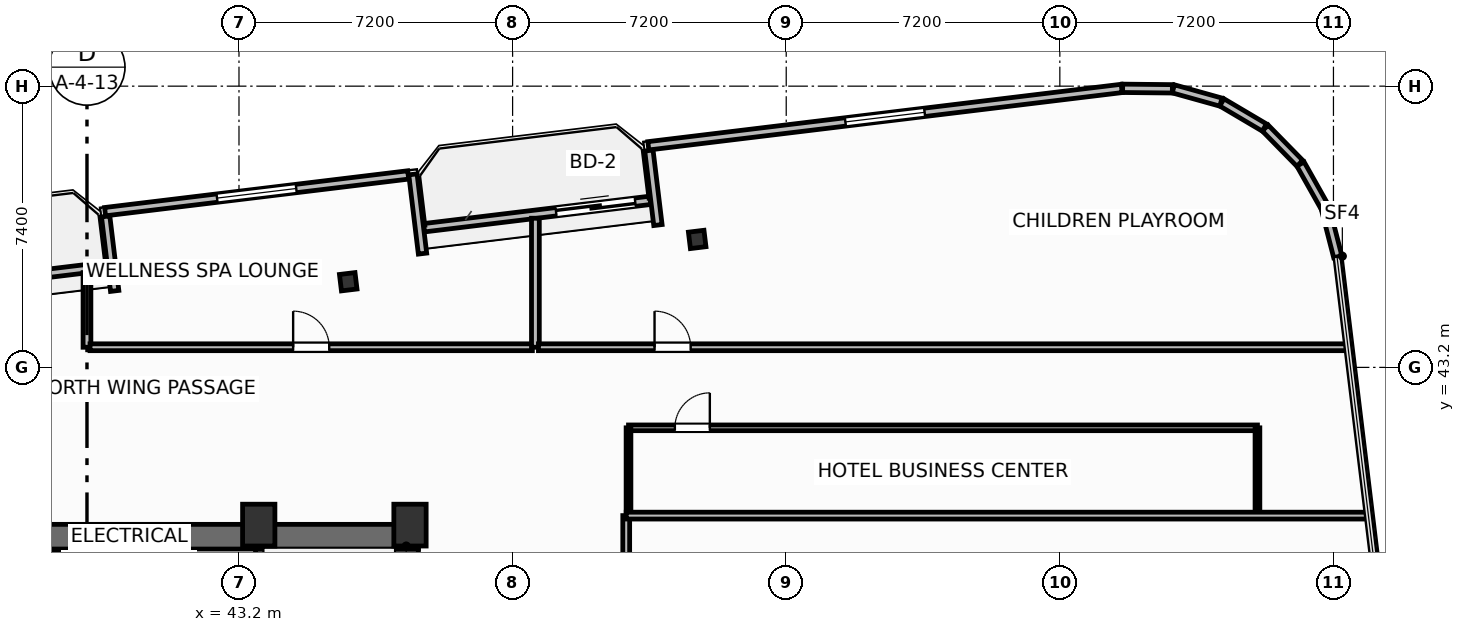
"""IFC4 building model, lengths in metres.
Left out: names, types, materials, properties, quantities, classifications, styles, units other than length and angle.
Written with IfcOpenShell. Run it as: python <this file> out.ifc"""

import sys

from ifc_helpers import new_model, si_unit, direction, frame, frame_2d, origin, origin_2d, place, context, subcontext, project, spatial, rectangle, i_section, extrude, element, fill, save


model = new_model("IFC4")
c1 = context("Model", 3, precision=1e-05, world=origin(), true_north=direction((0.0, 1.0)))
c2 = subcontext(c1, "Body", "Model", "MODEL_VIEW")
j1 = project(units=[si_unit("LENGTHUNIT", "METRE"), si_unit("PLANEANGLEUNIT", "RADIAN")], contexts=[c1])
p1 = place(None, origin())
s1 = spatial("IfcSite", under=j1, at=p1, CompositionType="ELEMENT")
p2 = place(p1, origin())
s2 = spatial("IfcBuilding", under=s1, at=p2, CompositionType="ELEMENT")
p3 = place(p2, frame((0.0, 0.0, 204.2)))
s3 = spatial("IfcBuildingStorey", under=s2, at=p3, CompositionType="ELEMENT", Elevation=204.2)
for number, where, z_axis, x_axis in (
    (1, (43.72, 39.05, 0.0), (0.0, 0.0, 1.0), (1.0, 0.0, 0.0)),
    (2, (47.7, 39.05, 0.0), (0.0, 0.0, 1.0), (1.0, 0.0, 0.0)),
):
    element("IfcColumn", number, at=place(p3, frame(where, z_axis=z_axis, x_axis=x_axis)), inside=s3, PredefinedType="COLUMN", context=c2, shape_type="SweptSolid", body=[
        extrude(rectangle(XDim=0.85, YDim=1.1, at=origin_2d()), origin(), (0.0, 0.0, 1.0), 3.7),
    ])
p4 = place(p3, frame((30.48, 38.745, 0.0), z_axis=(0.0, 0.0, 1.0), x_axis=(1.0, 0.0, 0.0)))
e3 = element("IfcWall", 3, at=p4, inside=s3, PredefinedType="SHEAR", context=c2, shape_type="SweptSolid", body=[
    extrude(rectangle(XDim=17.44, YDim=0.65, at=frame_2d((8.72, 0.0))), origin(), (0.0, 0.0, 1.0), 3.38),
])
p5 = place(p3, frame((47.595, 29.2, 0.0), z_axis=(0.0, 0.0, 1.0), x_axis=(0.0, 1.0, 0.0)))
e4 = element("IfcWall", 4, at=p5, inside=s3, PredefinedType="SHEAR", context=c2, shape_type="SweptSolid", body=[
    extrude(rectangle(XDim=9.22, YDim=0.65, at=frame_2d((4.61, 0.0))), origin(), (0.0, 0.0, 1.0), 3.38),
])
p6 = place(p3, frame((43.76, 29.2, 0.0), z_axis=(0.0, 0.0, 1.0), x_axis=(0.0, 1.0, 0.0)))
e5 = element("IfcWall", 5, at=p6, inside=s3, PredefinedType="SHEAR", context=c2, shape_type="SweptSolid", body=[
    extrude(rectangle(XDim=9.22, YDim=0.25, at=frame_2d((4.61, 0.0))), origin(), (0.0, 0.0, 1.0), 3.38),
])
p7 = place(p6, frame((0.65, 0.0, 0.0)))
e6 = element("IfcOpeningElement", 6, at=p7, cuts=e5, PredefinedType="OPENING", context=c2, shape_type="SweptSolid", body=[
    extrude(rectangle(XDim=1.05, YDim=2.15, at=frame_2d((0.525, 1.075))), frame((0.0, 0.135, 0.0), z_axis=(0.0, -1.0, 0.0), x_axis=(1.0, 0.0, 0.0)), (0.0, 0.0, 1.0), 0.27),
])
for number, where, z_axis, x_axis in (
    (7, (55.257, 46.567, 0.0), (0.0, 0.0, 1.0), (0.993, 0.12, 0.0)),
    (8, (46.075, 45.454, 0.0), (0.0, 0.0, 1.0), (0.993, 0.12, 0.0)),
):
    element("IfcColumn", number, at=place(p3, frame(where, z_axis=z_axis, x_axis=x_axis)), inside=s3, PredefinedType="COLUMN", context=c2, shape_type="SweptSolid", body=[
        extrude(i_section(OverallWidth=0.412, OverallDepth=0.435, WebThickness=0.036, FlangeThickness=0.057, FilletRadius=0.025, at=origin_2d()), origin(), (0.0, 0.0, 1.0), 3.7),
    ])
p8 = place(p3, frame((33.773, 45.141, 0.0), z_axis=(0.0, 0.0, 1.0), x_axis=(0.992735402148, 0.120318000826, 0.0)))
e9 = element("IfcWall", 9, at=p8, inside=s3, PredefinedType="SOLIDWALL", context=c2, shape_type="SweptSolid", body=[
    extrude(rectangle(XDim=6.0, YDim=0.22, at=frame_2d((3.0, 0.0))), origin(), (0.0, 0.0, 1.0), 2.66),
])
p9 = place(p8, frame((0.4, 0.0, 0.0)))
e10 = element("IfcOpeningElement", 10, at=p9, cuts=e9, PredefinedType="OPENING", context=c2, shape_type="SweptSolid", body=[
    extrude(rectangle(XDim=2.1, YDim=2.3, at=frame_2d((1.05, 1.15))), frame((0.0, 0.12, 0.0), z_axis=(0.0, -1.0, 0.0), x_axis=(1.0, 0.0, 0.0)), (0.0, 0.0, 1.0), 0.24),
])
p10 = place(p3, frame((48.068, 46.874, 0.0), z_axis=(0.0, 0.0, 1.0), x_axis=(0.992729951822, 0.120362962556, 0.0)))
e11 = element("IfcWall", 11, at=p10, inside=s3, PredefinedType="SOLIDWALL", context=c2, shape_type="SweptSolid", body=[
    extrude(rectangle(XDim=6.0, YDim=0.22, at=frame_2d((3.0, 0.0))), origin(), (0.0, 0.0, 1.0), 2.66),
])
p11 = place(p10, frame((3.5, 0.0, 0.0)))
e12 = element("IfcOpeningElement", 12, at=p11, cuts=e11, PredefinedType="OPENING", context=c2, shape_type="SweptSolid", body=[
    extrude(rectangle(XDim=2.1, YDim=2.3, at=frame_2d((1.05, 1.15))), frame((0.0, 0.12, 0.0), z_axis=(0.0, -1.0, 0.0), x_axis=(1.0, 0.0, 0.0)), (0.0, 0.0, 1.0), 0.24),
])
p12 = place(p3, frame((72.114, 46.112, 0.0), z_axis=(0.0, 0.0, 1.0), x_axis=(-0.248942347653, 0.968518305219, 0.0)))
e13 = element("IfcWall", 13, at=p12, inside=s3, PredefinedType="SOLIDWALL", context=c2, shape_type="SweptSolid", body=[
    extrude(rectangle(XDim=1.326, YDim=0.22, at=frame_2d((0.663, 0.0))), origin(), (0.0, 0.0, 1.0), 2.66),
])
p13 = place(p3, frame((71.771, 47.418, 0.0), z_axis=(0.0, 0.0, 1.0), x_axis=(-0.491098509465, 0.871104043155, 0.0)))
e14 = element("IfcWall", 14, at=p13, inside=s3, PredefinedType="SOLIDWALL", context=c2, shape_type="SweptSolid", body=[
    extrude(rectangle(XDim=1.301, YDim=0.22, at=frame_2d((0.65, 0.0))), origin(), (0.0, 0.0, 1.0), 2.66),
])
p14 = place(p3, frame((71.115, 48.569, 0.0), z_axis=(0.0, 0.0, 1.0), x_axis=(-0.699844331926, 0.714295394827, 0.0)))
e15 = element("IfcWall", 15, at=p14, inside=s3, PredefinedType="SOLIDWALL", context=c2, shape_type="SweptSolid", body=[
    extrude(rectangle(XDim=1.301, YDim=0.22, at=frame_2d((0.65, 0.0))), origin(), (0.0, 0.0, 1.0), 2.66),
])
p15 = place(p3, frame((70.183, 49.511, 0.0), z_axis=(0.0, 0.0, 1.0), x_axis=(-0.860933999601, 0.508716668029, 0.0)))
e16 = element("IfcWall", 16, at=p15, inside=s3, PredefinedType="SOLIDWALL", context=c2, shape_type="SweptSolid", body=[
    extrude(rectangle(XDim=1.301, YDim=0.22, at=frame_2d((0.65, 0.0))), origin(), (0.0, 0.0, 1.0), 2.66),
])
p16 = place(p3, frame((69.039, 50.18, 0.0), z_axis=(0.0, 0.0, 1.0), x_axis=(-0.963205341366, 0.26876657226, 0.0)))
e17 = element("IfcWall", 17, at=p16, inside=s3, PredefinedType="SOLIDWALL", context=c2, shape_type="SweptSolid", body=[
    extrude(rectangle(XDim=1.301, YDim=0.22, at=frame_2d((0.65, 0.0))), origin(), (0.0, 0.0, 1.0), 2.66),
])
p17 = place(p3, frame((67.761, 50.53, 0.0), z_axis=(0.0, 0.0, 1.0), x_axis=(-0.999947358106, 0.010260653861, 0.0)))
e18 = element("IfcWall", 18, at=p17, inside=s3, PredefinedType="SOLIDWALL", context=c2, shape_type="SweptSolid", body=[
    extrude(rectangle(XDim=1.309, YDim=0.22, at=frame_2d((0.654, 0.0))), origin(), (0.0, 0.0, 1.0), 2.66),
])
p18 = place(p3, frame((66.427, 50.54, 0.0), z_axis=(0.0, 0.0, 1.0), x_axis=(-0.992731739233, -0.120348219431, 0.0)))
e19 = element("IfcWall", 19, at=p18, inside=s3, PredefinedType="SOLIDWALL", context=c2, shape_type="SweptSolid", body=[
    extrude(rectangle(XDim=12.547, YDim=0.22, at=frame_2d((6.273, 0.0))), origin(), (0.0, 0.0, 1.0), 2.66),
])
p19 = place(p18, frame((5.224, 0.0, 0.8)))
e20 = element("IfcOpeningElement", 20, at=p19, cuts=e19, PredefinedType="OPENING", context=c2, shape_type="SweptSolid", body=[
    extrude(rectangle(XDim=2.1, YDim=1.75, at=frame_2d((1.05, 0.875))), frame((0.0, 0.12, 0.0), z_axis=(0.0, -1.0, 0.0), x_axis=(1.0, 0.0, 0.0)), (0.0, 0.0, 1.0), 0.24),
])
p20 = place(p3, frame((53.987, 48.906, 0.0), z_axis=(0.0, 0.0, 1.0), x_axis=(0.120397815541, -0.992725725472, 0.0)))
e21 = element("IfcWall", 21, at=p20, inside=s3, PredefinedType="SOLIDWALL", context=c2, shape_type="SweptSolid", body=[
    extrude(rectangle(XDim=1.975, YDim=0.22, at=frame_2d((0.988, 0.0))), origin(), (0.0, 0.0, 1.0), 2.66),
])
p21 = place(p3, frame((48.03, 46.194, 0.0), z_axis=(0.0, 0.0, 1.0), x_axis=(-0.120314009587, 0.992735885871, 0.0)))
e22 = element("IfcWall", 22, at=p21, inside=s3, PredefinedType="SOLIDWALL", context=c2, shape_type="SweptSolid", body=[
    extrude(rectangle(XDim=2.1, YDim=0.22, at=frame_2d((1.05, 0.0))), origin(), (0.0, 0.0, 1.0), 2.66),
])
p22 = place(p3, frame((47.653, 48.264, 0.0), z_axis=(0.0, 0.0, 1.0), x_axis=(-0.992731032022, -0.120354052946, 0.0)))
e23 = element("IfcWall", 23, at=p22, inside=s3, PredefinedType="SOLIDWALL", context=c2, shape_type="SweptSolid", body=[
    extrude(rectangle(XDim=8.035, YDim=0.22, at=frame_2d((4.018, 0.0))), origin(), (0.0, 0.0, 1.0), 2.66),
])
p23 = place(p22, frame((2.968, 0.0, 0.8)))
e24 = element("IfcOpeningElement", 24, at=p23, cuts=e23, PredefinedType="OPENING", context=c2, shape_type="SweptSolid", body=[
    extrude(rectangle(XDim=2.1, YDim=1.75, at=frame_2d((1.05, 0.875))), frame((0.0, 0.12, 0.0), z_axis=(0.0, -1.0, 0.0), x_axis=(1.0, 0.0, 0.0)), (0.0, 0.0, 1.0), 0.24),
])
p24 = place(p3, frame((39.691, 47.173, 0.0), z_axis=(0.0, 0.0, 1.0), x_axis=(0.120397815541, -0.992725725472, 0.0)))
e25 = element("IfcWall", 25, at=p24, inside=s3, PredefinedType="SOLIDWALL", context=c2, shape_type="SweptSolid", body=[
    extrude(rectangle(XDim=1.975, YDim=0.22, at=frame_2d((0.988, 0.0))), origin(), (0.0, 0.0, 1.0), 2.66),
])
p25 = place(p3, frame((53.45, 41.61, 0.0), z_axis=(0.0, 0.0, 1.0), x_axis=(1.0, 0.0, 0.0)))
e26 = element("IfcWall", 26, at=p25, inside=s3, PredefinedType="PARTITIONING", context=c2, shape_type="SweptSolid", body=[
    extrude(rectangle(XDim=16.55, YDim=0.15, at=frame_2d((8.275, 0.0))), origin(), (0.0, 0.0, 1.0), 3.38),
])
p26 = place(p25, frame((1.22, 0.0, 0.0)))
e27 = element("IfcOpeningElement", 27, at=p26, cuts=e26, PredefinedType="OPENING", context=c2, shape_type="SweptSolid", body=[
    extrude(rectangle(XDim=0.92, YDim=2.05, at=frame_2d((0.46, 1.025))), frame((0.0, 0.085, 0.0), z_axis=(0.0, -1.0, 0.0), x_axis=(1.0, 0.0, 0.0)), (0.0, 0.0, 1.0), 0.17),
])
for number, where, z_axis, x_axis in (
    (28, (53.45, 39.3, 0.0), (0.0, 0.0, 1.0), (0.0, 1.0, 0.0)),
    (29, (70.0, 39.3, 0.0), (0.0, 0.0, 1.0), (0.0, 1.0, 0.0)),
):
    element("IfcWall", number, at=place(p3, frame(where, z_axis=z_axis, x_axis=x_axis)), inside=s3, PredefinedType="PARTITIONING", context=c2, shape_type="SweptSolid", body=[
        extrude(rectangle(XDim=2.31, YDim=0.125, at=frame_2d((1.155, 0.0))), origin(), (0.0, 0.0, 1.0), 3.38),
    ])
p27 = place(p3, frame((39.2, 43.73, 0.0), z_axis=(0.0, 0.0, 1.0), x_axis=(0.0, 1.0, 0.0)))
e30 = element("IfcWall", 30, at=p27, inside=s3, PredefinedType="PARTITIONING", context=c2, shape_type="SweptSolid", body=[
    extrude(rectangle(XDim=1.964, YDim=0.205, at=frame_2d((0.982, 0.0))), origin(), (0.0, 0.0, 1.0), 3.38),
])
p28 = place(p3, frame((39.28, 43.73, 0.0), z_axis=(0.0, 0.0, 1.0), x_axis=(1.0, 0.0, 0.0)))
e31 = element("IfcWall", 31, at=p28, inside=s3, PredefinedType="PARTITIONING", context=c2, shape_type="SweptSolid", body=[
    extrude(rectangle(XDim=11.64, YDim=0.18, at=frame_2d((5.82, 0.0))), origin(), (0.0, 0.0, 1.0), 3.38),
])
p29 = place(p28, frame((5.345, 0.0, 0.0)))
e32 = element("IfcOpeningElement", 32, at=p29, cuts=e31, PredefinedType="OPENING", context=c2, shape_type="SweptSolid", body=[
    extrude(rectangle(XDim=0.95, YDim=2.05, at=frame_2d((0.475, 1.025))), frame((0.0, 0.1, 0.0), z_axis=(0.0, -1.0, 0.0), x_axis=(1.0, 0.0, 0.0)), (0.0, 0.0, 1.0), 0.2),
])
p30 = place(p3, frame((51.0, 43.73, 0.0), z_axis=(0.0, 0.0, 1.0), x_axis=(0.0, 1.0, 0.0)))
e33 = element("IfcWall", 33, at=p30, inside=s3, PredefinedType="PARTITIONING", context=c2, shape_type="SweptSolid", body=[
    extrude(rectangle(XDim=3.395, YDim=0.205, at=frame_2d((1.697, 0.0))), origin(), (0.0, 0.0, 1.0), 3.38),
])
p31 = place(p3, frame((51.08, 43.73, 0.0), z_axis=(0.0, 0.0, 1.0), x_axis=(1.0, 0.0, 0.0)))
e34 = element("IfcWall", 34, at=p31, inside=s3, PredefinedType="PARTITIONING", context=c2, shape_type="SweptSolid", body=[
    extrude(rectangle(XDim=21.263, YDim=0.18, at=frame_2d((10.632, 0.0))), origin(), (0.0, 0.0, 1.0), 3.38),
])
p32 = place(p31, frame((3.055, 0.0, 0.0)))
e35 = element("IfcOpeningElement", 35, at=p32, cuts=e34, PredefinedType="OPENING", context=c2, shape_type="SweptSolid", body=[
    extrude(rectangle(XDim=0.95, YDim=2.05, at=frame_2d((0.475, 1.025))), frame((0.0, 0.1, 0.0), z_axis=(0.0, -1.0, 0.0), x_axis=(1.0, 0.0, 0.0)), (0.0, 0.0, 1.0), 0.2),
])
p33 = place(p3, frame((53.39, 19.24, 0.0), z_axis=(0.0, 0.0, 1.0), x_axis=(0.0, 1.0, 0.0)))
e36 = element("IfcWall", 36, at=p33, inside=s3, PredefinedType="PARTITIONING", context=c2, shape_type="SweptSolid", body=[
    extrude(rectangle(XDim=20.06, YDim=0.18, at=frame_2d((10.03, 0.0))), origin(), (0.0, 0.0, 1.0), 3.38),
])
p34 = place(p33, frame((7.7, 0.0, 0.0)))
e37 = element("IfcOpeningElement", 37, at=p34, cuts=e36, PredefinedType="OPENING", context=c2, shape_type="SweptSolid", body=[
    extrude(rectangle(XDim=0.95, YDim=2.05, at=frame_2d((0.475, 1.025))), frame((0.0, 0.1, 0.0), z_axis=(0.0, -1.0, 0.0), x_axis=(1.0, 0.0, 0.0)), (0.0, 0.0, 1.0), 0.2),
])
p35 = place(p3, frame((53.39, 39.3, 0.0), z_axis=(0.0, 0.0, 1.0), x_axis=(1.0, 0.0, 0.0)))
e38 = element("IfcWall", 38, at=p35, inside=s3, PredefinedType="PARTITIONING", context=c2, shape_type="SweptSolid", body=[
    extrude(rectangle(XDim=19.49, YDim=0.18, at=frame_2d((9.745, 0.0))), origin(), (0.0, 0.0, 1.0), 3.38),
])
p36 = place(p11, origin())
e39 = element("IfcDoor", 39, at=p36, inside=s3, OperationType="SLIDING_TO_LEFT", PredefinedType="DOOR", context=c2, shape_type="SweptSolid", body=[
    extrude(rectangle(XDim=2.1, YDim=2.3, at=frame_2d((1.05, 1.15))), frame((0.0, 0.025, 0.0), z_axis=(0.0, -1.0, 0.0), x_axis=(1.0, 0.0, 0.0)), (0.0, 0.0, 1.0), 0.05),
])
fill(e12, e39)
p37 = place(p19, origin())
e40 = element("IfcWindow", 40, at=p37, inside=s3, PartitioningType="SINGLE_PANEL", PredefinedType="WINDOW", context=c2, shape_type="SweptSolid", body=[
    extrude(rectangle(XDim=2.1, YDim=1.75, at=frame_2d((1.05, 0.875))), frame((0.0, 0.03, 0.0), z_axis=(0.0, -1.0, 0.0), x_axis=(1.0, 0.0, 0.0)), (0.0, 0.0, 1.0), 0.06),
])
fill(e20, e40)
p38 = place(p23, origin())
e41 = element("IfcWindow", 41, at=p38, inside=s3, PartitioningType="SINGLE_PANEL", PredefinedType="WINDOW", context=c2, shape_type="SweptSolid", body=[
    extrude(rectangle(XDim=2.1, YDim=1.75, at=frame_2d((1.05, 0.875))), frame((0.0, 0.03, 0.0), z_axis=(0.0, -1.0, 0.0), x_axis=(1.0, 0.0, 0.0)), (0.0, 0.0, 1.0), 0.06),
])
fill(e24, e41)
p39 = place(p26, origin())
e42 = element("IfcDoor", 42, at=p39, inside=s3, OperationType="SINGLE_SWING_RIGHT", PredefinedType="DOOR", context=c2, shape_type="SweptSolid", body=[
    extrude(rectangle(XDim=0.92, YDim=2.05, at=frame_2d((0.46, 1.025))), frame((0.0, 0.025, 0.0), z_axis=(0.0, -1.0, 0.0), x_axis=(1.0, 0.0, 0.0)), (0.0, 0.0, 1.0), 0.05),
])
fill(e27, e42)
p40 = place(p29, origin())
e43 = element("IfcDoor", 43, at=p40, inside=s3, OperationType="SINGLE_SWING_LEFT", PredefinedType="DOOR", context=c2, shape_type="SweptSolid", body=[
    extrude(rectangle(XDim=0.95, YDim=2.05, at=frame_2d((0.475, 1.025))), frame((0.0, 0.025, 0.0), z_axis=(0.0, -1.0, 0.0), x_axis=(1.0, 0.0, 0.0)), (0.0, 0.0, 1.0), 0.05),
])
fill(e32, e43)
p41 = place(p32, origin())
e44 = element("IfcDoor", 44, at=p41, inside=s3, OperationType="SINGLE_SWING_LEFT", PredefinedType="DOOR", context=c2, shape_type="SweptSolid", body=[
    extrude(rectangle(XDim=0.95, YDim=2.05, at=frame_2d((0.475, 1.025))), frame((0.0, 0.025, 0.0), z_axis=(0.0, -1.0, 0.0), x_axis=(1.0, 0.0, 0.0)), (0.0, 0.0, 1.0), 0.05),
])
fill(e35, e44)
save(model, sys.argv[1])
